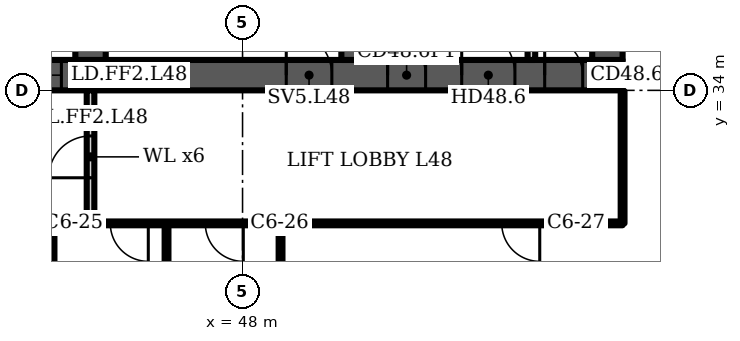
"""IFC4 building model, lengths in metres.
Left out: names, types, materials, properties, quantities, classifications, styles, units other than length and angle.
Written with IfcOpenShell. Run it as: python <this file> out.ifc"""

import sys

from ifc_helpers import new_model, si_unit, direction, frame, frame_2d, origin, place, context, subcontext, project, spatial, polyline, rectangle, outline, extrude, element, fill, save


model = new_model("IFC4")
c1 = context("Model", 3, precision=1e-05, world=origin(), true_north=direction((0.0, 1.0)))
c2 = subcontext(c1, "Body", "Model", "MODEL_VIEW")
j1 = project(units=[si_unit("LENGTHUNIT", "METRE"), si_unit("PLANEANGLEUNIT", "RADIAN")], contexts=[c1])
p1 = place(None, origin())
s1 = spatial("IfcSite", under=j1, at=p1, CompositionType="ELEMENT")
p2 = place(p1, origin())
s2 = spatial("IfcBuilding", under=s1, at=p2, CompositionType="ELEMENT")
p3 = place(p2, frame((0.0, 0.0, 195.1)))
s3 = spatial("IfcBuildingStorey", under=s2, at=p3, CompositionType="ELEMENT", Elevation=195.1)
p4 = place(p3, frame((16.0, 34.4, 0.0), z_axis=(0.0, 0.0, 1.0), x_axis=(1.0, 0.0, 0.0)))
e1 = element("IfcWall", 1, at=p4, inside=s3, PredefinedType="SHEAR", context=c2, shape_type="SweptSolid", body=[
    extrude(rectangle(XDim=42.0, YDim=0.8, at=frame_2d((21.0, 0.0))), origin(), (0.0, 0.0, 1.0), 3.6),
])
p5 = place(p4, frame((3.2, 0.0, 0.0)))
e2 = element("IfcOpeningElement", 2, at=p5, cuts=e1, PredefinedType="OPENING", context=c2, shape_type="SweptSolid", body=[
    extrude(rectangle(XDim=1.0, YDim=2.1, at=frame_2d((0.5, 1.05))), frame((0.0, 0.41, 0.0), z_axis=(0.0, -1.0, 0.0), x_axis=(1.0, 0.0, 0.0)), (0.0, 0.0, 1.0), 0.82),
])
p6 = place(p4, frame((7.65, 0.0, 0.0)))
e3 = element("IfcOpeningElement", 3, at=p6, cuts=e1, PredefinedType="OPENING", context=c2, shape_type="SweptSolid", body=[
    extrude(rectangle(XDim=1.2, YDim=2.1, at=frame_2d((0.6, 1.05))), frame((0.0, 0.41, 0.0), z_axis=(0.0, -1.0, 0.0), x_axis=(1.0, 0.0, 0.0)), (0.0, 0.0, 1.0), 0.82),
])
p7 = place(p4, frame((14.767, 0.0, 0.0)))
e4 = element("IfcOpeningElement", 4, at=p7, cuts=e1, PredefinedType="OPENING", context=c2, shape_type="SweptSolid", body=[
    extrude(rectangle(XDim=1.1, YDim=2.1, at=frame_2d((0.55, 1.05))), frame((0.0, 0.41, 0.0), z_axis=(0.0, -1.0, 0.0), x_axis=(1.0, 0.0, 0.0)), (0.0, 0.0, 1.0), 0.82),
])
p8 = place(p4, frame((19.133, 0.0, 0.0)))
e5 = element("IfcOpeningElement", 5, at=p8, cuts=e1, PredefinedType="OPENING", context=c2, shape_type="SweptSolid", body=[
    extrude(rectangle(XDim=1.1, YDim=2.1, at=frame_2d((0.55, 1.05))), frame((0.0, 0.41, 0.0), z_axis=(0.0, -1.0, 0.0), x_axis=(1.0, 0.0, 0.0)), (0.0, 0.0, 1.0), 0.82),
])
p9 = place(p4, frame((16.8, 0.0, 0.0)))
e6 = element("IfcOpeningElement", 6, at=p9, cuts=e1, PredefinedType="OPENING", context=c2, shape_type="SweptSolid", body=[
    extrude(rectangle(XDim=1.4, YDim=2.1, at=frame_2d((0.7, 1.05))), frame((0.0, 0.41, 0.0), z_axis=(0.0, -1.0, 0.0), x_axis=(1.0, 0.0, 0.0)), (0.0, 0.0, 1.0), 0.82),
])
p10 = place(p4, frame((21.767, 0.0, 0.0)))
e7 = element("IfcOpeningElement", 7, at=p10, cuts=e1, PredefinedType="OPENING", context=c2, shape_type="SweptSolid", body=[
    extrude(rectangle(XDim=1.1, YDim=2.1, at=frame_2d((0.55, 1.05))), frame((0.0, 0.41, 0.0), z_axis=(0.0, -1.0, 0.0), x_axis=(1.0, 0.0, 0.0)), (0.0, 0.0, 1.0), 0.82),
])
p11 = place(p4, frame((23.95, 0.0, 0.0)))
e8 = element("IfcOpeningElement", 8, at=p11, cuts=e1, PredefinedType="OPENING", context=c2, shape_type="SweptSolid", body=[
    extrude(rectangle(XDim=1.1, YDim=2.1, at=frame_2d((0.55, 1.05))), frame((0.0, 0.41, 0.0), z_axis=(0.0, -1.0, 0.0), x_axis=(1.0, 0.0, 0.0)), (0.0, 0.0, 1.0), 0.82),
])
p12 = place(p4, frame((26.133, 0.0, 0.0)))
e9 = element("IfcOpeningElement", 9, at=p12, cuts=e1, PredefinedType="OPENING", context=c2, shape_type="SweptSolid", body=[
    extrude(rectangle(XDim=1.1, YDim=2.1, at=frame_2d((0.55, 1.05))), frame((0.0, 0.41, 0.0), z_axis=(0.0, -1.0, 0.0), x_axis=(1.0, 0.0, 0.0)), (0.0, 0.0, 1.0), 0.82),
])
p13 = place(p4, frame((33.15, 0.0, 0.0)))
e10 = element("IfcOpeningElement", 10, at=p13, cuts=e1, PredefinedType="OPENING", context=c2, shape_type="SweptSolid", body=[
    extrude(rectangle(XDim=1.2, YDim=2.1, at=frame_2d((0.6, 1.05))), frame((0.0, 0.41, 0.0), z_axis=(0.0, -1.0, 0.0), x_axis=(1.0, 0.0, 0.0)), (0.0, 0.0, 1.0), 0.82),
])
p14 = place(p4, frame((35.817, 0.0, 0.0)))
e11 = element("IfcOpeningElement", 11, at=p14, cuts=e1, PredefinedType="OPENING", context=c2, shape_type="SweptSolid", body=[
    extrude(rectangle(XDim=1.0, YDim=2.1, at=frame_2d((0.5, 1.05))), frame((0.0, 0.41, 0.0), z_axis=(0.0, -1.0, 0.0), x_axis=(1.0, 0.0, 0.0)), (0.0, 0.0, 1.0), 0.82),
])
p15 = place(p4, frame((39.95, 0.0, 0.0)))
e12 = element("IfcOpeningElement", 12, at=p15, cuts=e1, PredefinedType="OPENING", context=c2, shape_type="SweptSolid", body=[
    extrude(rectangle(XDim=1.0, YDim=2.1, at=frame_2d((0.5, 1.05))), frame((0.0, 0.41, 0.0), z_axis=(0.0, -1.0, 0.0), x_axis=(1.0, 0.0, 0.0)), (0.0, 0.0, 1.0), 0.82),
])
p16 = place(p4, frame((37.767, 0.0, 0.0)))
e13 = element("IfcOpeningElement", 13, at=p16, cuts=e1, PredefinedType="OPENING", context=c2, shape_type="SweptSolid", body=[
    extrude(rectangle(XDim=1.4, YDim=2.1, at=frame_2d((0.7, 1.05))), frame((0.0, 0.41, 0.0), z_axis=(0.0, -1.0, 0.0), x_axis=(1.0, 0.0, 0.0)), (0.0, 0.0, 1.0), 0.82),
])
p17 = place(p3, frame((44.0, 34.8, 0.0), z_axis=(0.0, 0.0, 1.0), x_axis=(0.0, 1.0, 0.0)))
e14 = element("IfcWall", 14, at=p17, inside=s3, PredefinedType="SHEAR", context=c2, shape_type="SweptSolid", body=[
    extrude(rectangle(XDim=14.374, YDim=0.8, at=frame_2d((7.187, 0.0))), origin(), (0.0, 0.0, 1.0), 3.6),
])
p18 = place(p17, frame((11.312, 0.0, 0.0)))
e15 = element("IfcOpeningElement", 15, at=p18, cuts=e14, PredefinedType="OPENING", context=c2, shape_type="SweptSolid", body=[
    extrude(rectangle(XDim=1.0, YDim=2.1, at=frame_2d((0.5, 1.05))), frame((0.0, 0.41, 0.0), z_axis=(0.0, -1.0, 0.0), x_axis=(1.0, 0.0, 0.0)), (0.0, 0.0, 1.0), 0.82),
])
p19 = place(p17, frame((3.6, 0.0, 0.0)))
e16 = element("IfcOpeningElement", 16, at=p19, cuts=e14, PredefinedType="OPENING", context=c2, shape_type="SweptSolid", body=[
    extrude(rectangle(XDim=1.1, YDim=2.1, at=frame_2d((0.55, 1.05))), frame((0.0, 0.41, 0.0), z_axis=(0.0, -1.0, 0.0), x_axis=(1.0, 0.0, 0.0)), (0.0, 0.0, 1.0), 0.82),
])
p20 = place(p3, frame((51.0, 34.8, 0.0), z_axis=(0.0, 0.0, 1.0), x_axis=(0.0, 1.0, 0.0)))
e17 = element("IfcWall", 17, at=p20, inside=s3, PredefinedType="SHEAR", context=c2, shape_type="SweptSolid", body=[
    extrude(rectangle(XDim=13.762, YDim=0.8, at=frame_2d((6.881, 0.0))), origin(), (0.0, 0.0, 1.0), 3.6),
])
p21 = place(p20, frame((3.6, 0.0, 0.0)))
e18 = element("IfcOpeningElement", 18, at=p21, cuts=e17, PredefinedType="OPENING", context=c2, shape_type="SweptSolid", body=[
    extrude(rectangle(XDim=1.1, YDim=2.1, at=frame_2d((0.55, 1.05))), frame((0.0, 0.41, 0.0), z_axis=(0.0, -1.0, 0.0), x_axis=(1.0, 0.0, 0.0)), (0.0, 0.0, 1.0), 0.82),
])
p22 = place(p3, frame((57.6, 34.8, 0.0), z_axis=(0.0, 0.0, 1.0), x_axis=(0.0, 1.0, 0.0)))
e19 = element("IfcWall", 19, at=p22, inside=s3, PredefinedType="SHEAR", context=c2, shape_type="SweptSolid", body=[
    extrude(rectangle(XDim=13.184, YDim=0.8, at=frame_2d((6.592, 0.0))), origin(), (0.0, 0.0, 1.0), 3.6),
])
p23 = place(p3, frame((0.0, 0.0, -0.0)))
e20 = element("IfcWall", 20, at=p23, inside=s3, PredefinedType="PARTITIONING", context=c2, shape_type="SweptSolid", body=[
    extrude(outline(polyline([(41.567, 37.1), (39.433, 37.1), (39.433, 34.8), (39.233, 34.8), (39.233, 37.65), (37.4, 37.65), (37.4, 37.85), (39.233, 37.85), (39.433, 37.85), (39.433, 37.3), (41.567, 37.3), (41.567, 37.55), (41.767, 37.55), (43.6, 37.55), (43.6, 37.35), (41.767, 37.35), (41.767, 34.8), (41.567, 34.8), (41.567, 37.1)])), origin(), (0.0, 0.0, 1.0), 3.2),
])
p24 = place(p3, frame((0.0, 0.0, -0.0)))
e21 = element("IfcWall", 21, at=p24, inside=s3, PredefinedType="PARTITIONING", context=c2, shape_type="SweptSolid", body=[
    extrude(outline(polyline([(53.233, 34.8), (53.233, 37.3), (53.433, 37.3), (53.433, 34.8), (53.233, 34.8)])), origin(), (0.0, 0.0, 1.0), 3.2),
])
p25 = place(p3, frame((0.0, 0.0, -0.0)))
e22 = element("IfcWall", 22, at=p25, inside=s3, PredefinedType="PARTITIONING", context=c2, shape_type="SweptSolid", body=[
    extrude(outline(polyline([(55.5, 34.8), (55.5, 37.3), (55.7, 37.3), (55.7, 34.8), (55.5, 34.8)])), origin(), (0.0, 0.0, 1.0), 3.2),
])
p26 = place(p3, frame((44.0, 30.5, 0.0), z_axis=(0.0, 0.0, 1.0), x_axis=(0.0, 1.0, 0.0)))
e23 = element("IfcWall", 23, at=p26, inside=s3, PredefinedType="PARTITIONING", context=c2, shape_type="SweptSolid", body=[
    extrude(rectangle(XDim=3.5, YDim=0.2, at=frame_2d((1.75, 0.0))), origin(), (0.0, 0.0, 1.0), 3.2),
])
p27 = place(p26, frame((1.2, 0.0, 0.0)))
e24 = element("IfcOpeningElement", 24, at=p27, cuts=e23, PredefinedType="OPENING", context=c2, shape_type="SweptSolid", body=[
    extrude(rectangle(XDim=1.1, YDim=2.1, at=frame_2d((0.55, 1.05))), frame((0.0, 0.11, 0.0), z_axis=(0.0, -1.0, 0.0), x_axis=(1.0, 0.0, 0.0)), (0.0, 0.0, 1.0), 0.22),
])
p28 = place(p3, frame((41.1, 30.6, 0.0), z_axis=(0.0, 0.0, 1.0), x_axis=(1.0, 0.0, 0.0)))
e25 = element("IfcWall", 25, at=p28, inside=s3, PredefinedType="PARTITIONING", context=c2, shape_type="SweptSolid", body=[
    extrude(rectangle(XDim=2.8, YDim=0.2, at=frame_2d((1.4, 0.0))), origin(), (0.0, 0.0, 1.0), 3.2),
])
p29 = place(p3, frame((43.0, 22.34, 0.0), z_axis=(0.0, 0.0, 1.0), x_axis=(0.0, 1.0, 0.0)))
e26 = element("IfcWall", 26, at=p29, inside=s3, PredefinedType="PARTITIONING", context=c2, shape_type="SweptSolid", body=[
    extrude(rectangle(XDim=8.15, YDim=0.1, at=frame_2d((4.075, 0.0))), origin(), (0.0, 0.0, 1.0), 3.2),
])
for number, where, z_axis, x_axis in (
    (27, (46.0, 22.34, 0.0), (0.0, 0.0, 1.0), (0.0, 1.0, 0.0)),
    (28, (49.0, 22.34, 0.0), (0.0, 0.0, 1.0), (0.0, 1.0, 0.0)),
):
    element("IfcWall", number, at=place(p3, frame(where, z_axis=z_axis, x_axis=x_axis)), inside=s3, PredefinedType="PARTITIONING", context=c2, shape_type="SweptSolid", body=[
        extrude(rectangle(XDim=8.16, YDim=0.1, at=frame_2d((4.08, 0.0))), origin(), (0.0, 0.0, 1.0), 3.2),
    ])
p30 = place(p3, frame((58.0, 30.5, 0.0), z_axis=(0.0, 0.0, 1.0), x_axis=(0.0, 1.0, 0.0)))
e29 = element("IfcWall", 29, at=p30, inside=s3, PredefinedType="PARTITIONING", context=c2, shape_type="SweptSolid", body=[
    extrude(rectangle(XDim=3.48, YDim=0.1, at=frame_2d((1.74, 0.0))), origin(), (0.0, 0.0, 1.0), 3.2),
])
p31 = place(p3, frame((44.15, 30.5, 0.0), z_axis=(0.0, 0.0, 1.0), x_axis=(1.0, 0.0, 0.0)))
e30 = element("IfcWall", 30, at=p31, inside=s3, PredefinedType="PARTITIONING", context=c2, shape_type="SweptSolid", body=[
    extrude(rectangle(XDim=13.85, YDim=0.1, at=frame_2d((6.925, 0.0))), origin(), (0.0, 0.0, 1.0), 3.2),
])
p32 = place(p31, frame((0.37, 0.0, 0.0)))
e31 = element("IfcOpeningElement", 31, at=p32, cuts=e30, PredefinedType="OPENING", context=c2, shape_type="SweptSolid", body=[
    extrude(rectangle(XDim=1.0, YDim=2.1, at=frame_2d((0.5, 1.05))), frame((0.0, 0.06, 0.0), z_axis=(0.0, -1.0, 0.0), x_axis=(1.0, 0.0, 0.0)), (0.0, 0.0, 1.0), 0.12),
])
p33 = place(p31, frame((2.87, 0.0, 0.0)))
e32 = element("IfcOpeningElement", 32, at=p33, cuts=e30, PredefinedType="OPENING", context=c2, shape_type="SweptSolid", body=[
    extrude(rectangle(XDim=1.0, YDim=2.1, at=frame_2d((0.5, 1.05))), frame((0.0, 0.06, 0.0), z_axis=(0.0, -1.0, 0.0), x_axis=(1.0, 0.0, 0.0)), (0.0, 0.0, 1.0), 0.12),
])
p34 = place(p31, frame((10.67, 0.0, 0.0)))
e33 = element("IfcOpeningElement", 33, at=p34, cuts=e30, PredefinedType="OPENING", context=c2, shape_type="SweptSolid", body=[
    extrude(rectangle(XDim=1.0, YDim=2.1, at=frame_2d((0.5, 1.05))), frame((0.0, 0.06, 0.0), z_axis=(0.0, -1.0, 0.0), x_axis=(1.0, 0.0, 0.0)), (0.0, 0.0, 1.0), 0.12),
])
p35 = place(p12, origin())
e34 = element("IfcDoor", 34, at=p35, inside=s3, OperationType="DOUBLE_DOOR_SLIDING", PredefinedType="DOOR", context=c2, shape_type="SweptSolid", body=[
    extrude(rectangle(XDim=1.1, YDim=2.1, at=frame_2d((0.55, 1.05))), frame((0.0, 0.025, 0.0), z_axis=(0.0, -1.0, 0.0), x_axis=(1.0, 0.0, 0.0)), (0.0, 0.0, 1.0), 0.05),
])
fill(e9, e34)
p36 = place(p13, origin())
e35 = element("IfcDoor", 35, at=p36, inside=s3, OperationType="SINGLE_SWING_LEFT", PredefinedType="DOOR", context=c2, shape_type="SweptSolid", body=[
    extrude(rectangle(XDim=1.2, YDim=2.1, at=frame_2d((0.6, 1.05))), frame((0.0, 0.025, 0.0), z_axis=(0.0, -1.0, 0.0), x_axis=(1.0, 0.0, 0.0)), (0.0, 0.0, 1.0), 0.05),
])
fill(e10, e35)
p37 = place(p14, origin())
e36 = element("IfcDoor", 36, at=p37, inside=s3, OperationType="SINGLE_SWING_LEFT", PredefinedType="DOOR", context=c2, shape_type="SweptSolid", body=[
    extrude(rectangle(XDim=1.0, YDim=2.1, at=frame_2d((0.5, 1.05))), frame((0.0, 0.4, 0.0), z_axis=(0.0, -1.0, 0.0), x_axis=(1.0, 0.0, 0.0)), (0.0, 0.0, 1.0), 0.8),
])
fill(e11, e36)
p38 = place(p15, origin())
e37 = element("IfcDoor", 37, at=p38, inside=s3, OperationType="SINGLE_SWING_LEFT", PredefinedType="DOOR", context=c2, shape_type="SweptSolid", body=[
    extrude(rectangle(XDim=1.0, YDim=2.1, at=frame_2d((0.5, 1.05))), frame((0.0, 0.4, 0.0), z_axis=(0.0, -1.0, 0.0), x_axis=(1.0, 0.0, 0.0)), (0.0, 0.0, 1.0), 0.8),
])
fill(e12, e37)
p39 = place(p16, origin())
e38 = element("IfcDoor", 38, at=p39, inside=s3, OperationType="DOUBLE_DOOR_SINGLE_SWING", PredefinedType="DOOR", context=c2, shape_type="SweptSolid", body=[
    extrude(rectangle(XDim=1.4, YDim=2.1, at=frame_2d((0.7, 1.05))), frame((0.0, 0.025, 0.0), z_axis=(0.0, -1.0, 0.0), x_axis=(1.0, 0.0, 0.0)), (0.0, 0.0, 1.0), 0.05),
])
fill(e13, e38)
p40 = place(p27, origin())
e39 = element("IfcDoor", 39, at=p40, inside=s3, OperationType="SINGLE_SWING_LEFT", PredefinedType="DOOR", context=c2, shape_type="SweptSolid", body=[
    extrude(rectangle(XDim=1.1, YDim=2.1, at=frame_2d((0.55, 1.05))), frame((0.0, 0.025, 0.0), z_axis=(0.0, -1.0, 0.0), x_axis=(1.0, 0.0, 0.0)), (0.0, 0.0, 1.0), 0.05),
])
fill(e24, e39)
p41 = place(p32, origin())
e40 = element("IfcDoor", 40, at=p41, inside=s3, OperationType="SINGLE_SWING_RIGHT", PredefinedType="DOOR", context=c2, shape_type="SweptSolid", body=[
    extrude(rectangle(XDim=1.0, YDim=2.1, at=frame_2d((0.5, 1.05))), frame((0.0, 0.025, 0.0), z_axis=(0.0, -1.0, 0.0), x_axis=(1.0, 0.0, 0.0)), (0.0, 0.0, 1.0), 0.05),
])
fill(e31, e40)
p42 = place(p33, origin())
e41 = element("IfcDoor", 41, at=p42, inside=s3, OperationType="SINGLE_SWING_RIGHT", PredefinedType="DOOR", context=c2, shape_type="SweptSolid", body=[
    extrude(rectangle(XDim=1.0, YDim=2.1, at=frame_2d((0.5, 1.05))), frame((0.0, 0.025, 0.0), z_axis=(0.0, -1.0, 0.0), x_axis=(1.0, 0.0, 0.0)), (0.0, 0.0, 1.0), 0.05),
])
fill(e32, e41)
p43 = place(p34, origin())
e42 = element("IfcDoor", 42, at=p43, inside=s3, OperationType="SINGLE_SWING_RIGHT", PredefinedType="DOOR", context=c2, shape_type="SweptSolid", body=[
    extrude(rectangle(XDim=1.0, YDim=2.1, at=frame_2d((0.5, 1.05))), frame((0.0, 0.025, 0.0), z_axis=(0.0, -1.0, 0.0), x_axis=(1.0, 0.0, 0.0)), (0.0, 0.0, 1.0), 0.05),
])
fill(e33, e42)
save(model, sys.argv[1])
